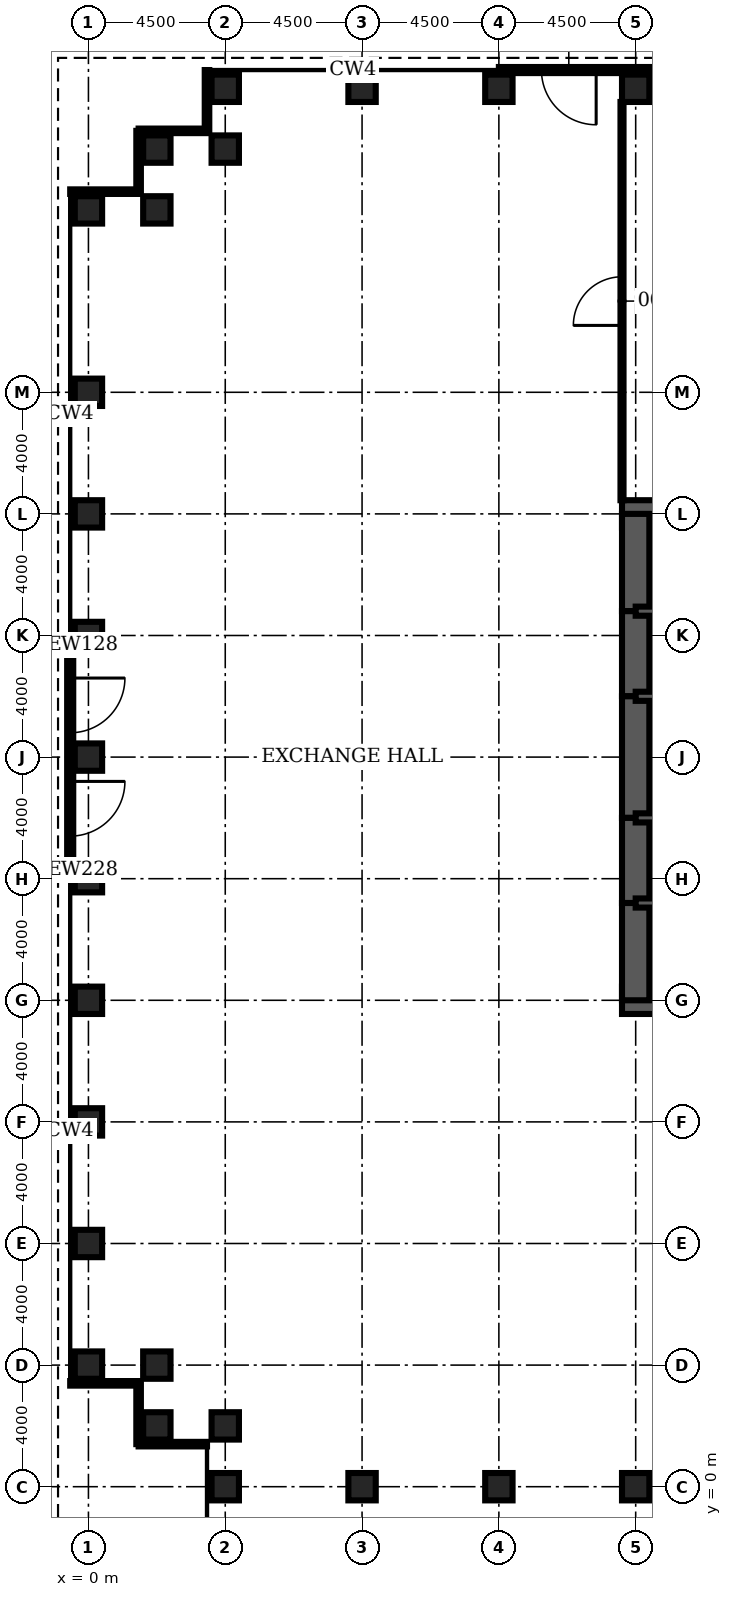
"""IFC4 building model, lengths in metres.
Left out: names, types, materials, properties, quantities, classifications, styles, units other than length and angle.
Written with IfcOpenShell. Run it as: python <this file> out.ifc"""

import sys

from ifc_helpers import new_model, si_unit, direction, frame, frame_2d, origin, origin_2d, place, context, subcontext, project, spatial, rectangle, hollow_rectangle, extrude, element, fill, save


model = new_model("IFC4")
c1 = context("Model", 3, precision=1e-05, world=origin(), true_north=direction((0.0, 1.0)))
c2 = subcontext(c1, "Body", "Model", "MODEL_VIEW")
j1 = project(units=[si_unit("LENGTHUNIT", "METRE"), si_unit("PLANEANGLEUNIT", "RADIAN")], contexts=[c1])
p1 = place(None, origin())
s1 = spatial("IfcSite", under=j1, at=p1, CompositionType="ELEMENT")
p2 = place(p1, origin())
s2 = spatial("IfcBuilding", under=s1, at=p2, CompositionType="ELEMENT")
p3 = place(p2, origin())
s3 = spatial("IfcBuildingStorey", under=s2, at=p3, CompositionType="ELEMENT", Elevation=0.0)
for number, where, z_axis, x_axis in (
    (1, (4.5, 0.0, 0.0), (0.0, 0.0, 1.0), (0.0, 1.0, 0.0)),
    (2, (9.0, 0.0, 0.0), (0.0, 0.0, 1.0), (0.0, 1.0, 0.0)),
    (3, (13.5, 0.0, 0.0), (0.0, 0.0, 1.0), (0.0, 1.0, 0.0)),
    (4, (18.0, 0.0, 0.0), (0.0, 0.0, 1.0), (0.0, 1.0, 0.0)),
    (5, (18.0, 46.0, 0.0), (0.0, 0.0, 1.0), (0.0, 1.0, 0.0)),
    (6, (13.5, 46.0, 0.0), (0.0, 0.0, 1.0), (0.0, 1.0, 0.0)),
    (7, (9.0, 46.0, 0.0), (0.0, 0.0, 1.0), (0.0, 1.0, 0.0)),
    (8, (4.5, 46.0, 0.0), (0.0, 0.0, 1.0), (0.0, 1.0, 0.0)),
    (9, (4.5, 44.0, 0.0), (0.0, 0.0, 1.0), (0.0, 1.0, 0.0)),
    (10, (2.25, 44.0, 0.0), (0.0, 0.0, 1.0), (1.0, 0.0, 0.0)),
    (11, (2.25, 42.0, 0.0), (0.0, 0.0, 1.0), (1.0, 0.0, 0.0)),
    (12, (0.0, 42.0, 0.0), (0.0, 0.0, 1.0), (1.0, 0.0, 0.0)),
    (13, (0.0, 36.0, 0.0), (0.0, 0.0, 1.0), (1.0, 0.0, 0.0)),
    (14, (0.0, 32.0, 0.0), (0.0, 0.0, 1.0), (1.0, 0.0, 0.0)),
    (15, (0.0, 28.0, 0.0), (0.0, 0.0, 1.0), (1.0, 0.0, 0.0)),
    (16, (0.0, 24.0, 0.0), (0.0, 0.0, 1.0), (1.0, 0.0, 0.0)),
    (17, (0.0, 20.0, 0.0), (0.0, 0.0, 1.0), (1.0, 0.0, 0.0)),
    (18, (0.0, 16.0, 0.0), (0.0, 0.0, 1.0), (1.0, 0.0, 0.0)),
    (19, (0.0, 12.0, 0.0), (0.0, 0.0, 1.0), (1.0, 0.0, 0.0)),
    (20, (0.0, 8.0, 0.0), (0.0, 0.0, 1.0), (1.0, 0.0, 0.0)),
    (21, (0.0, 4.0, 0.0), (0.0, 0.0, 1.0), (1.0, 0.0, 0.0)),
    (22, (2.25, 4.0, 0.0), (0.0, 0.0, 1.0), (1.0, 0.0, 0.0)),
    (23, (2.25, 2.0, 0.0), (0.0, 0.0, 1.0), (1.0, 0.0, 0.0)),
    (24, (4.5, 2.0, 0.0), (0.0, 0.0, 1.0), (0.0, 1.0, 0.0)),
):
    element("IfcColumn", number, at=place(p3, frame(where, z_axis=z_axis, x_axis=x_axis)), inside=s3, PredefinedType="COLUMN", context=c2, shape_type="SweptSolid", body=[
        extrude(hollow_rectangle(XDim=0.9, YDim=0.9, WallThickness=0.12, at=origin_2d()), origin(), (0.0, 0.0, 1.0), 6.0),
    ])
for number, where, z_axis, x_axis in (
    (25, (17.55, 16.0, 0.0), (0.0, 0.0, 1.0), (1.0, 0.0, 0.0)),
    (26, (27.0, 32.0, 0.0), (0.0, 0.0, 1.0), (-1.0, 0.0, 0.0)),
):
    element("IfcWall", number, at=place(p3, frame(where, z_axis=z_axis, x_axis=x_axis)), inside=s3, PredefinedType="SHEAR", context=c2, shape_type="SweptSolid", body=[
        extrude(rectangle(XDim=9.45, YDim=0.9, at=frame_2d((4.725, 0.0))), origin(), (0.0, 0.0, 1.0), 6.0),
    ])
p4 = place(p3, frame((18.0, 32.0, 0.0), z_axis=(0.0, 0.0, 1.0), x_axis=(0.0, -1.0, 0.0)))
e27 = element("IfcWall", 27, at=p4, inside=s3, PredefinedType="SHEAR", context=c2, shape_type="SweptSolid", body=[
    extrude(rectangle(XDim=3.2, YDim=0.9, at=frame_2d((1.6, 0.0))), origin(), (0.0, 0.0, 1.0), 6.0),
])
p5 = place(p3, frame((18.0, 28.8, 0.0), z_axis=(0.0, 0.0, 1.0), x_axis=(0.0, -1.0, 0.0)))
e28 = element("IfcWall", 28, at=p5, inside=s3, PredefinedType="SHEAR", context=c2, shape_type="SweptSolid", body=[
    extrude(rectangle(XDim=2.8, YDim=0.9, at=frame_2d((1.4, 0.0))), origin(), (0.0, 0.0, 1.0), 6.0),
])
p6 = place(p5, frame((0.4, 0.0, 0.0)))
e29 = element("IfcOpeningElement", 29, at=p6, cuts=e28, PredefinedType="OPENING", context=c2, shape_type="SweptSolid", body=[
    extrude(rectangle(XDim=1.8, YDim=2.1, at=frame_2d((0.9, 1.05))), frame((0.0, 0.46, 0.0), z_axis=(0.0, -1.0, 0.0), x_axis=(1.0, 0.0, 0.0)), (0.0, 0.0, 1.0), 0.92),
])
p7 = place(p3, frame((18.0, 26.0, 0.0), z_axis=(0.0, 0.0, 1.0), x_axis=(0.0, -1.0, 0.0)))
e30 = element("IfcWall", 30, at=p7, inside=s3, PredefinedType="SHEAR", context=c2, shape_type="SweptSolid", body=[
    extrude(rectangle(XDim=4.0, YDim=0.9, at=frame_2d((2.0, 0.0))), origin(), (0.0, 0.0, 1.0), 6.0),
])
p8 = place(p3, frame((18.0, 22.0, 0.0), z_axis=(0.0, 0.0, 1.0), x_axis=(0.0, -1.0, 0.0)))
e31 = element("IfcWall", 31, at=p8, inside=s3, PredefinedType="SHEAR", context=c2, shape_type="SweptSolid", body=[
    extrude(rectangle(XDim=2.8, YDim=0.9, at=frame_2d((1.4, 0.0))), origin(), (0.0, 0.0, 1.0), 6.0),
])
p9 = place(p8, frame((0.6, 0.0, 0.0)))
e32 = element("IfcOpeningElement", 32, at=p9, cuts=e31, PredefinedType="OPENING", context=c2, shape_type="SweptSolid", body=[
    extrude(rectangle(XDim=1.8, YDim=2.1, at=frame_2d((0.9, 1.05))), frame((0.0, 0.46, 0.0), z_axis=(0.0, -1.0, 0.0), x_axis=(1.0, 0.0, 0.0)), (0.0, 0.0, 1.0), 0.92),
])
p10 = place(p3, frame((18.0, 19.2, 0.0), z_axis=(0.0, 0.0, 1.0), x_axis=(0.0, -1.0, 0.0)))
e33 = element("IfcWall", 33, at=p10, inside=s3, PredefinedType="SHEAR", context=c2, shape_type="SweptSolid", body=[
    extrude(rectangle(XDim=3.2, YDim=0.9, at=frame_2d((1.6, 0.0))), origin(), (0.0, 0.0, 1.0), 6.0),
])
p11 = place(p3, frame((18.0, 19.2, 0.0), z_axis=(0.0, 0.0, 1.0), x_axis=(1.0, 0.0, 0.0)))
e34 = element("IfcWall", 34, at=p11, inside=s3, PredefinedType="SOLIDWALL", context=c2, shape_type="SweptSolid", body=[
    extrude(rectangle(XDim=9.0, YDim=0.3, at=frame_2d((4.5, 0.0))), origin(), (0.0, 0.0, 1.0), 6.0),
])
p12 = place(p11, frame((0.65, 0.0, 0.0)))
e35 = element("IfcOpeningElement", 35, at=p12, cuts=e34, PredefinedType="OPENING", context=c2, shape_type="SweptSolid", body=[
    extrude(rectangle(XDim=1.0, YDim=2.1, at=frame_2d((0.5, 1.05))), frame((0.0, 0.16, 0.0), z_axis=(0.0, -1.0, 0.0), x_axis=(1.0, 0.0, 0.0)), (0.0, 0.0, 1.0), 0.32),
])
p13 = place(p3, frame((18.0, 28.8, 0.0), z_axis=(0.0, 0.0, 1.0), x_axis=(1.0, 0.0, 0.0)))
e36 = element("IfcWall", 36, at=p13, inside=s3, PredefinedType="SOLIDWALL", context=c2, shape_type="SweptSolid", body=[
    extrude(rectangle(XDim=9.0, YDim=0.3, at=frame_2d((4.5, 0.0))), origin(), (0.0, 0.0, 1.0), 6.0),
])
p14 = place(p13, frame((0.65, 0.0, 0.0)))
e37 = element("IfcOpeningElement", 37, at=p14, cuts=e36, PredefinedType="OPENING", context=c2, shape_type="SweptSolid", body=[
    extrude(rectangle(XDim=1.0, YDim=2.1, at=frame_2d((0.5, 1.05))), frame((0.0, 0.16, 0.0), z_axis=(0.0, -1.0, 0.0), x_axis=(1.0, 0.0, 0.0)), (0.0, 0.0, 1.0), 0.32),
])
p15 = place(p3, frame((18.0, 22.0, 0.0), z_axis=(0.0, 0.0, 1.0), x_axis=(1.0, 0.0, 0.0)))
e38 = element("IfcWall", 38, at=p15, inside=s3, PredefinedType="SOLIDWALL", context=c2, shape_type="SweptSolid", body=[
    extrude(rectangle(XDim=6.0, YDim=0.3, at=frame_2d((3.0, 0.0))), origin(), (0.0, 0.0, 1.0), 6.0),
])
p16 = place(p15, frame((2.0, 0.0, 0.0)))
e39 = element("IfcOpeningElement", 39, at=p16, cuts=e38, PredefinedType="OPENING", context=c2, shape_type="SweptSolid", body=[
    extrude(rectangle(XDim=1.0, YDim=2.1, at=frame_2d((0.5, 1.05))), frame((0.0, 0.16, 0.0), z_axis=(0.0, -1.0, 0.0), x_axis=(1.0, 0.0, 0.0)), (0.0, 0.0, 1.0), 0.32),
])
p17 = place(p3, frame((18.0, 26.0, 0.0), z_axis=(0.0, 0.0, 1.0), x_axis=(1.0, 0.0, 0.0)))
e40 = element("IfcWall", 40, at=p17, inside=s3, PredefinedType="SOLIDWALL", context=c2, shape_type="SweptSolid", body=[
    extrude(rectangle(XDim=6.0, YDim=0.3, at=frame_2d((3.0, 0.0))), origin(), (0.0, 0.0, 1.0), 6.0),
])
p18 = place(p3, frame((17.55, 32.45, 0.0), z_axis=(0.0, 0.0, 1.0), x_axis=(0.0, 1.0, 0.0)))
e41 = element("IfcWall", 41, at=p18, inside=s3, PredefinedType="PARTITIONING", context=c2, shape_type="SweptSolid", body=[
    extrude(rectangle(XDim=13.1, YDim=0.1, at=frame_2d((6.55, 0.0))), origin(), (0.0, 0.0, 1.0), 3.0),
])
p19 = place(p18, frame((5.75, 0.0, 0.0)))
e42 = element("IfcOpeningElement", 42, at=p19, cuts=e41, PredefinedType="OPENING", context=c2, shape_type="SweptSolid", body=[
    extrude(rectangle(XDim=1.6, YDim=2.1, at=frame_2d((0.8, 1.05))), frame((0.0, 0.06, 0.0), z_axis=(0.0, -1.0, 0.0), x_axis=(1.0, 0.0, 0.0)), (0.0, 0.0, 1.0), 0.12),
])
p20 = place(p3, frame((22.5, 46.6, 0.0), z_axis=(0.0, 0.0, 1.0), x_axis=(-1.0, 0.0, 0.0)))
e43 = element("IfcWall", 43, at=p20, inside=s3, PredefinedType="USERDEFINED", context=c2, shape_type="SweptSolid", body=[
    extrude(rectangle(XDim=9.0, YDim=0.2, at=frame_2d((4.5, 0.0))), origin(), (0.0, 0.0, 1.0), 5.82),
])
p21 = place(p20, frame((1.4, 0.0, 0.0)))
e44 = element("IfcOpeningElement", 44, at=p21, cuts=e43, PredefinedType="OPENING", context=c2, shape_type="SweptSolid", body=[
    extrude(rectangle(XDim=1.8, YDim=2.4, at=frame_2d((0.9, 1.2))), frame((0.0, 0.11, 0.0), z_axis=(0.0, -1.0, 0.0), x_axis=(1.0, 0.0, 0.0)), (0.0, 0.0, 1.0), 0.22),
])
p22 = place(p20, frame((5.8, 0.0, 0.0)))
e45 = element("IfcOpeningElement", 45, at=p22, cuts=e43, PredefinedType="OPENING", context=c2, shape_type="SweptSolid", body=[
    extrude(rectangle(XDim=1.8, YDim=2.4, at=frame_2d((0.9, 1.2))), frame((0.0, 0.11, 0.0), z_axis=(0.0, -1.0, 0.0), x_axis=(1.0, 0.0, 0.0)), (0.0, 0.0, 1.0), 0.22),
])
p23 = place(p3, frame((3.9, 46.6, 0.0), z_axis=(0.0, 0.0, 1.0), x_axis=(0.0, -1.0, 0.0)))
e46 = element("IfcWall", 46, at=p23, inside=s3, PredefinedType="ELEMENTEDWALL", context=c2, shape_type="SweptSolid", body=[
    extrude(rectangle(XDim=2.0, YDim=0.15, at=frame_2d((1.0, 0.0))), origin(), (0.0, 0.0, 1.0), 5.82),
])
p24 = place(p3, frame((3.9, 44.6, 0.0), z_axis=(0.0, 0.0, 1.0), x_axis=(-1.0, 0.0, 0.0)))
e47 = element("IfcWall", 47, at=p24, inside=s3, PredefinedType="ELEMENTEDWALL", context=c2, shape_type="SweptSolid", body=[
    extrude(rectangle(XDim=2.25, YDim=0.15, at=frame_2d((1.125, 0.0))), origin(), (0.0, 0.0, 1.0), 5.82),
])
p25 = place(p3, frame((1.65, 44.6, 0.0), z_axis=(0.0, 0.0, 1.0), x_axis=(0.0, -1.0, 0.0)))
e48 = element("IfcWall", 48, at=p25, inside=s3, PredefinedType="ELEMENTEDWALL", context=c2, shape_type="SweptSolid", body=[
    extrude(rectangle(XDim=2.0, YDim=0.15, at=frame_2d((1.0, 0.0))), origin(), (0.0, 0.0, 1.0), 5.82),
])
p26 = place(p3, frame((1.65, 42.6, 0.0), z_axis=(0.0, 0.0, 1.0), x_axis=(-1.0, 0.0, 0.0)))
e49 = element("IfcWall", 49, at=p26, inside=s3, PredefinedType="ELEMENTEDWALL", context=c2, shape_type="SweptSolid", body=[
    extrude(rectangle(XDim=2.25, YDim=0.15, at=frame_2d((1.125, 0.0))), origin(), (0.0, 0.0, 1.0), 5.82),
])
p27 = place(p3, frame((-0.6, 28.0, 0.0), z_axis=(0.0, 0.0, 1.0), x_axis=(0.0, -1.0, 0.0)))
e50 = element("IfcWall", 50, at=p27, inside=s3, PredefinedType="USERDEFINED", context=c2, shape_type="SweptSolid", body=[
    extrude(rectangle(XDim=8.0, YDim=0.2, at=frame_2d((4.0, 0.0))), origin(), (0.0, 0.0, 1.0), 5.82),
])
p28 = place(p27, frame((1.4, 0.0, 0.0)))
e51 = element("IfcOpeningElement", 51, at=p28, cuts=e50, PredefinedType="OPENING", context=c2, shape_type="SweptSolid", body=[
    extrude(rectangle(XDim=1.8, YDim=2.4, at=frame_2d((0.9, 1.2))), frame((0.0, 0.11, 0.0), z_axis=(0.0, -1.0, 0.0), x_axis=(1.0, 0.0, 0.0)), (0.0, 0.0, 1.0), 0.22),
])
p29 = place(p27, frame((4.8, 0.0, 0.0)))
e52 = element("IfcOpeningElement", 52, at=p29, cuts=e50, PredefinedType="OPENING", context=c2, shape_type="SweptSolid", body=[
    extrude(rectangle(XDim=1.8, YDim=2.4, at=frame_2d((0.9, 1.2))), frame((0.0, 0.11, 0.0), z_axis=(0.0, -1.0, 0.0), x_axis=(1.0, 0.0, 0.0)), (0.0, 0.0, 1.0), 0.22),
])
p30 = place(p3, frame((-0.6, 3.4, 0.0), z_axis=(0.0, 0.0, 1.0), x_axis=(1.0, 0.0, 0.0)))
e53 = element("IfcWall", 53, at=p30, inside=s3, PredefinedType="ELEMENTEDWALL", context=c2, shape_type="SweptSolid", body=[
    extrude(rectangle(XDim=2.25, YDim=0.15, at=frame_2d((1.125, 0.0))), origin(), (0.0, 0.0, 1.0), 5.82),
])
p31 = place(p3, frame((1.65, 3.4, 0.0), z_axis=(0.0, 0.0, 1.0), x_axis=(0.0, -1.0, 0.0)))
e54 = element("IfcWall", 54, at=p31, inside=s3, PredefinedType="ELEMENTEDWALL", context=c2, shape_type="SweptSolid", body=[
    extrude(rectangle(XDim=2.0, YDim=0.15, at=frame_2d((1.0, 0.0))), origin(), (0.0, 0.0, 1.0), 5.82),
])
p32 = place(p3, frame((1.65, 1.4, 0.0), z_axis=(0.0, 0.0, 1.0), x_axis=(1.0, 0.0, 0.0)))
e55 = element("IfcWall", 55, at=p32, inside=s3, PredefinedType="ELEMENTEDWALL", context=c2, shape_type="SweptSolid", body=[
    extrude(rectangle(XDim=2.25, YDim=0.15, at=frame_2d((1.125, 0.0))), origin(), (0.0, 0.0, 1.0), 5.82),
])
p33 = place(p19, origin())
e56 = element("IfcDoor", 56, at=p33, inside=s3, OperationType="SINGLE_SWING_LEFT", PredefinedType="DOOR", context=c2, shape_type="SweptSolid", body=[
    extrude(rectangle(XDim=1.6, YDim=2.1, at=frame_2d((0.8, 1.05))), frame((0.0, 0.025, 0.0), z_axis=(0.0, -1.0, 0.0), x_axis=(1.0, 0.0, 0.0)), (0.0, 0.0, 1.0), 0.05),
])
fill(e42, e56)
p34 = place(p22, origin())
e57 = element("IfcDoor", 57, at=p34, inside=s3, OperationType="SINGLE_SWING_LEFT", PredefinedType="DOOR", context=c2, shape_type="SweptSolid", body=[
    extrude(rectangle(XDim=1.8, YDim=2.4, at=frame_2d((0.9, 1.2))), frame((0.0, 0.025, 0.0), z_axis=(0.0, -1.0, 0.0), x_axis=(1.0, 0.0, 0.0)), (0.0, 0.0, 1.0), 0.05),
])
fill(e45, e57)
p35 = place(p28, origin())
e58 = element("IfcDoor", 58, at=p35, inside=s3, OperationType="SINGLE_SWING_LEFT", PredefinedType="DOOR", context=c2, shape_type="SweptSolid", body=[
    extrude(rectangle(XDim=1.8, YDim=2.4, at=frame_2d((0.9, 1.2))), frame((0.0, 0.025, 0.0), z_axis=(0.0, -1.0, 0.0), x_axis=(1.0, 0.0, 0.0)), (0.0, 0.0, 1.0), 0.05),
])
fill(e51, e58)
p36 = place(p29, origin())
e59 = element("IfcDoor", 59, at=p36, inside=s3, OperationType="SINGLE_SWING_LEFT", PredefinedType="DOOR", context=c2, shape_type="SweptSolid", body=[
    extrude(rectangle(XDim=1.8, YDim=2.4, at=frame_2d((0.9, 1.2))), frame((0.0, 0.025, 0.0), z_axis=(0.0, -1.0, 0.0), x_axis=(1.0, 0.0, 0.0)), (0.0, 0.0, 1.0), 0.05),
])
fill(e52, e59)
p37 = place(p9, origin())
e60 = element("IfcDoor", 60, at=p37, inside=s3, OperationType="SINGLE_SWING_LEFT", PredefinedType="DOOR", context=c2, shape_type="SweptSolid", body=[
    extrude(rectangle(XDim=1.8, YDim=2.1, at=frame_2d((0.9, 1.05))), frame((0.0, 0.45, 0.0), z_axis=(0.0, -1.0, 0.0), x_axis=(1.0, 0.0, 0.0)), (0.0, 0.0, 1.0), 0.899),
])
fill(e32, e60)
p38 = place(p6, origin())
e61 = element("IfcDoor", 61, at=p38, inside=s3, OperationType="SINGLE_SWING_LEFT", PredefinedType="DOOR", context=c2, shape_type="SweptSolid", body=[
    extrude(rectangle(XDim=1.8, YDim=2.1, at=frame_2d((0.9, 1.05))), frame((0.0, 0.45, 0.0), z_axis=(0.0, -1.0, 0.0), x_axis=(1.0, 0.0, 0.0)), (0.0, 0.0, 1.0), 0.899),
])
fill(e29, e61)
save(model, sys.argv[1])
